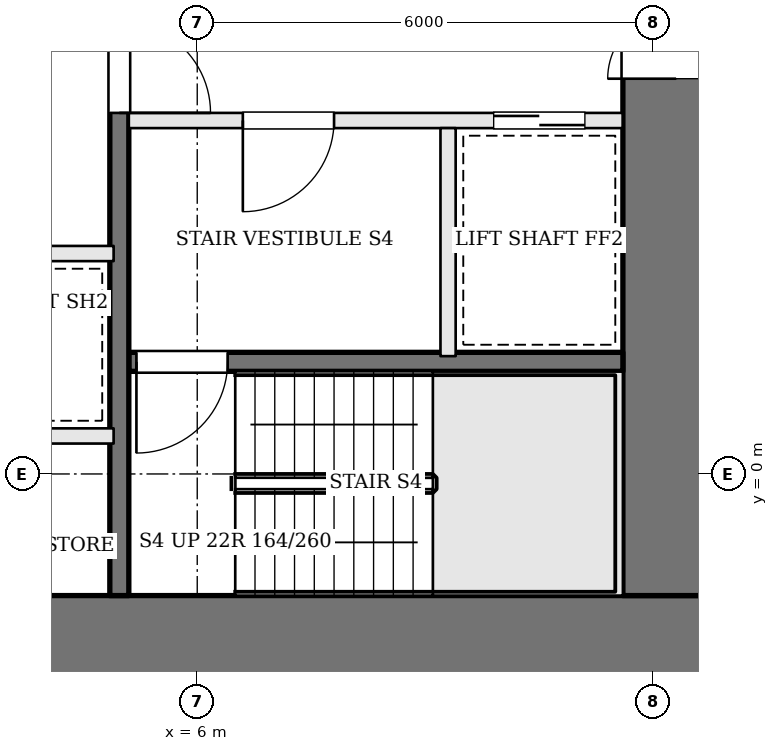
"""IFC4 building model, lengths in metres.
Left out: names, types, materials, properties, quantities, classifications, styles, units other than length and angle.
Written with IfcOpenShell. Run it as: python <this file> out.ifc"""

import sys

from ifc_helpers import new_model, si_unit, direction, frame, frame_2d, origin, place, context, subcontext, project, spatial, rectangle, extrude, element, fill, save


model = new_model("IFC4")
c1 = context("Model", 3, precision=1e-05, world=origin(), true_north=direction((0.0, 1.0)))
c2 = subcontext(c1, "Body", "Model", "MODEL_VIEW")
j1 = project(units=[si_unit("LENGTHUNIT", "METRE"), si_unit("PLANEANGLEUNIT", "RADIAN")], contexts=[c1])
p1 = place(None, origin())
s1 = spatial("IfcSite", under=j1, at=p1, CompositionType="ELEMENT")
p2 = place(p1, origin())
s2 = spatial("IfcBuilding", under=s1, at=p2, CompositionType="ELEMENT")
p3 = place(p2, frame((0.0, 0.0, 41.1)))
s3 = spatial("IfcBuildingStorey", under=s2, at=p3, CompositionType="ELEMENT", Elevation=41.1)
p4 = place(p3, frame((-13.0, -2.3, 0.0), z_axis=(0.0, 0.0, 1.0), x_axis=(1.0, 0.0, 0.0)))
e1 = element("IfcWall", 1, at=p4, inside=s3, PredefinedType="SHEAR", context=c2, shape_type="SweptSolid", body=[
    extrude(rectangle(XDim=26.0, YDim=1.4, at=frame_2d((13.0, 0.0))), origin(), (0.0, 0.0, 1.0), 3.6),
])
p5 = place(p4, frame((8.825, 0.0, 0.0)))
e2 = element("IfcOpeningElement", 2, at=p5, cuts=e1, PredefinedType="OPENING", context=c2, shape_type="SweptSolid", body=[
    extrude(rectangle(XDim=1.0, YDim=2.1, at=frame_2d((0.5, 1.05))), frame((0.0, 0.71, 0.0), z_axis=(0.0, -1.0, 0.0), x_axis=(1.0, 0.0, 0.0)), (0.0, 0.0, 1.0), 1.42),
])
p6 = place(p4, frame((11.275, 0.0, 0.0)))
e3 = element("IfcOpeningElement", 3, at=p6, cuts=e1, PredefinedType="OPENING", context=c2, shape_type="SweptSolid", body=[
    extrude(rectangle(XDim=1.0, YDim=2.1, at=frame_2d((0.5, 1.05))), frame((0.0, 0.71, 0.0), z_axis=(0.0, -1.0, 0.0), x_axis=(1.0, 0.0, 0.0)), (0.0, 0.0, 1.0), 1.42),
])
p7 = place(p4, frame((13.475, 0.0, 0.0)))
e4 = element("IfcOpeningElement", 4, at=p7, cuts=e1, PredefinedType="OPENING", context=c2, shape_type="SweptSolid", body=[
    extrude(rectangle(XDim=0.7, YDim=2.1, at=frame_2d((0.35, 1.05))), frame((0.0, 0.71, 0.0), z_axis=(0.0, -1.0, 0.0), x_axis=(1.0, 0.0, 0.0)), (0.0, 0.0, 1.0), 1.42),
])
p8 = place(p4, frame((15.775, 0.0, 0.0)))
e5 = element("IfcOpeningElement", 5, at=p8, cuts=e1, PredefinedType="OPENING", context=c2, shape_type="SweptSolid", body=[
    extrude(rectangle(XDim=1.0, YDim=2.1, at=frame_2d((0.5, 1.05))), frame((0.0, 0.71, 0.0), z_axis=(0.0, -1.0, 0.0), x_axis=(1.0, 0.0, 0.0)), (0.0, 0.0, 1.0), 1.42),
])
p9 = place(p3, frame((12.3, -1.6, 0.0), z_axis=(0.0, 0.0, 1.0), x_axis=(0.0, 1.0, 0.0)))
e6 = element("IfcWall", 6, at=p9, inside=s3, PredefinedType="SHEAR", context=c2, shape_type="SweptSolid", body=[
    extrude(rectangle(XDim=12.2, YDim=1.4, at=frame_2d((6.1, 0.0))), origin(), (0.0, 0.0, 1.0), 3.6),
])
p10 = place(p9, frame((6.8, 0.0, 0.0)))
e7 = element("IfcOpeningElement", 7, at=p10, cuts=e6, PredefinedType="OPENING", context=c2, shape_type="SweptSolid", body=[
    extrude(rectangle(XDim=1.8, YDim=2.1, at=frame_2d((0.9, 1.05))), frame((0.0, 0.71, 0.0), z_axis=(0.0, -1.0, 0.0), x_axis=(1.0, 0.0, 0.0)), (0.0, 0.0, 1.0), 1.42),
])
p11 = place(p3, frame((11.6, 4.65, 0.0), z_axis=(0.0, 0.0, 1.0), x_axis=(-1.0, 0.0, 0.0)))
e8 = element("IfcWall", 8, at=p11, inside=s3, PredefinedType="SOLIDWALL", context=c2, shape_type="SweptSolid", body=[
    extrude(rectangle(XDim=6.5, YDim=0.2, at=frame_2d((3.25, 0.0))), origin(), (0.0, 0.0, 1.0), 3.4),
])
p12 = place(p11, frame((3.8, 0.0, 0.0)))
e9 = element("IfcOpeningElement", 9, at=p12, cuts=e8, PredefinedType="OPENING", context=c2, shape_type="SweptSolid", body=[
    extrude(rectangle(XDim=1.2, YDim=2.1, at=frame_2d((0.6, 1.05))), frame((0.0, 0.11, 0.0), z_axis=(0.0, -1.0, 0.0), x_axis=(1.0, 0.0, 0.0)), (0.0, 0.0, 1.0), 0.22),
])
p13 = place(p11, frame((0.5, 0.0, 0.0)))
e10 = element("IfcOpeningElement", 10, at=p13, cuts=e8, PredefinedType="OPENING", context=c2, shape_type="SweptSolid", body=[
    extrude(rectangle(XDim=1.2, YDim=2.1, at=frame_2d((0.6, 1.05))), frame((0.0, 0.11, 0.0), z_axis=(0.0, -1.0, 0.0), x_axis=(1.0, 0.0, 0.0)), (0.0, 0.0, 1.0), 0.22),
])
p14 = place(p3, frame((11.6, 1.475, 0.0), z_axis=(0.0, 0.0, 1.0), x_axis=(-1.0, 0.0, 0.0)))
e11 = element("IfcWall", 11, at=p14, inside=s3, PredefinedType="SOLIDWALL", context=c2, shape_type="SweptSolid", body=[
    extrude(rectangle(XDim=6.5, YDim=0.25, at=frame_2d((3.25, 0.0))), origin(), (0.0, 0.0, 1.0), 3.4),
])
p15 = place(p14, frame((5.2, 0.0, 0.0)))
e12 = element("IfcOpeningElement", 12, at=p15, cuts=e11, PredefinedType="OPENING", context=c2, shape_type="SweptSolid", body=[
    extrude(rectangle(XDim=1.2, YDim=2.1, at=frame_2d((0.6, 1.05))), frame((0.0, 0.135, 0.0), z_axis=(0.0, -1.0, 0.0), x_axis=(1.0, 0.0, 0.0)), (0.0, 0.0, 1.0), 0.27),
])
p16 = place(p3, frame((9.3, 4.55, 0.0), z_axis=(0.0, 0.0, 1.0), x_axis=(0.0, -1.0, 0.0)))
e13 = element("IfcWall", 13, at=p16, inside=s3, PredefinedType="SOLIDWALL", context=c2, shape_type="SweptSolid", body=[
    extrude(rectangle(XDim=3.0, YDim=0.2, at=frame_2d((1.5, 0.0))), origin(), (0.0, 0.0, 1.0), 3.4),
])
p17 = place(p3, frame((4.975, 10.6, 0.0), z_axis=(0.0, 0.0, 1.0), x_axis=(0.0, -1.0, 0.0)))
e14 = element("IfcWall", 14, at=p17, inside=s3, PredefinedType="SOLIDWALL", context=c2, shape_type="SweptSolid", body=[
    extrude(rectangle(XDim=12.2, YDim=0.25, at=frame_2d((6.1, 0.0))), origin(), (0.0, 0.0, 1.0), 3.4),
])
p18 = place(p17, frame((4.65, 0.0, 0.0)))
e15 = element("IfcOpeningElement", 15, at=p18, cuts=e14, PredefinedType="OPENING", context=c2, shape_type="SweptSolid", body=[
    extrude(rectangle(XDim=1.2, YDim=2.1, at=frame_2d((0.6, 1.05))), frame((0.0, 0.135, 0.0), z_axis=(0.0, -1.0, 0.0), x_axis=(1.0, 0.0, 0.0)), (0.0, 0.0, 1.0), 0.27),
])
p19 = place(p3, frame((-4.9, 0.5, 0.0), z_axis=(0.0, 0.0, 1.0), x_axis=(1.0, 0.0, 0.0)))
e16 = element("IfcWall", 16, at=p19, inside=s3, PredefinedType="SOLIDWALL", context=c2, shape_type="SweptSolid", body=[
    extrude(rectangle(XDim=9.8, YDim=0.2, at=frame_2d((4.9, 0.0))), origin(), (0.0, 0.0, 1.0), 3.4),
])
p20 = place(p3, frame((-4.9, 2.9, 0.0), z_axis=(0.0, 0.0, 1.0), x_axis=(1.0, 0.0, 0.0)))
e17 = element("IfcWall", 17, at=p20, inside=s3, PredefinedType="SOLIDWALL", context=c2, shape_type="SweptSolid", body=[
    extrude(rectangle(XDim=9.8, YDim=0.2, at=frame_2d((4.9, 0.0))), origin(), (0.0, 0.0, 1.0), 3.4),
])
p21 = place(p20, frame((0.675, 0.0, 0.0)))
e18 = element("IfcOpeningElement", 18, at=p21, cuts=e17, PredefinedType="OPENING", context=c2, shape_type="SweptSolid", body=[
    extrude(rectangle(XDim=1.1, YDim=2.1, at=frame_2d((0.55, 1.05))), frame((0.0, 0.11, 0.0), z_axis=(0.0, -1.0, 0.0), x_axis=(1.0, 0.0, 0.0)), (0.0, 0.0, 1.0), 0.22),
])
p22 = place(p20, frame((3.125, 0.0, 0.0)))
e19 = element("IfcOpeningElement", 19, at=p22, cuts=e17, PredefinedType="OPENING", context=c2, shape_type="SweptSolid", body=[
    extrude(rectangle(XDim=1.1, YDim=2.1, at=frame_2d((0.55, 1.05))), frame((0.0, 0.11, 0.0), z_axis=(0.0, -1.0, 0.0), x_axis=(1.0, 0.0, 0.0)), (0.0, 0.0, 1.0), 0.22),
])
p23 = place(p10, origin())
e20 = element("IfcDoor", 20, at=p23, inside=s3, OperationType="DOUBLE_DOOR_SINGLE_SWING", PredefinedType="DOOR", context=c2, shape_type="SweptSolid", body=[
    extrude(rectangle(XDim=1.8, YDim=2.1, at=frame_2d((0.9, 1.05))), frame((0.0, 0.025, 0.0), z_axis=(0.0, -1.0, 0.0), x_axis=(1.0, 0.0, 0.0)), (0.0, 0.0, 1.0), 0.05),
])
fill(e7, e20)
p24 = place(p18, origin())
e21 = element("IfcDoor", 21, at=p24, inside=s3, OperationType="SINGLE_SWING_RIGHT", PredefinedType="DOOR", context=c2, shape_type="SweptSolid", body=[
    extrude(rectangle(XDim=1.2, YDim=2.1, at=frame_2d((0.6, 1.05))), frame((0.0, 0.025, 0.0), z_axis=(0.0, -1.0, 0.0), x_axis=(1.0, 0.0, 0.0)), (0.0, 0.0, 1.0), 0.05),
])
fill(e15, e21)
p25 = place(p12, origin())
e22 = element("IfcDoor", 22, at=p25, inside=s3, OperationType="SINGLE_SWING_RIGHT", PredefinedType="DOOR", context=c2, shape_type="SweptSolid", body=[
    extrude(rectangle(XDim=1.2, YDim=2.1, at=frame_2d((0.6, 1.05))), frame((0.0, 0.025, 0.0), z_axis=(0.0, -1.0, 0.0), x_axis=(1.0, 0.0, 0.0)), (0.0, 0.0, 1.0), 0.05),
])
fill(e9, e22)
p26 = place(p15, origin())
e23 = element("IfcDoor", 23, at=p26, inside=s3, OperationType="SINGLE_SWING_RIGHT", PredefinedType="DOOR", context=c2, shape_type="SweptSolid", body=[
    extrude(rectangle(XDim=1.2, YDim=2.1, at=frame_2d((0.6, 1.05))), frame((0.0, 0.025, 0.0), z_axis=(0.0, -1.0, 0.0), x_axis=(1.0, 0.0, 0.0)), (0.0, 0.0, 1.0), 0.05),
])
fill(e12, e23)
p27 = place(p13, origin())
e24 = element("IfcDoor", 24, at=p27, inside=s3, OperationType="SLIDING_TO_RIGHT", PredefinedType="DOOR", context=c2, shape_type="SweptSolid", body=[
    extrude(rectangle(XDim=1.2, YDim=2.1, at=frame_2d((0.6, 1.05))), frame((0.0, 0.025, 0.0), z_axis=(0.0, -1.0, 0.0), x_axis=(1.0, 0.0, 0.0)), (0.0, 0.0, 1.0), 0.05),
])
fill(e10, e24)
save(model, sys.argv[1])
